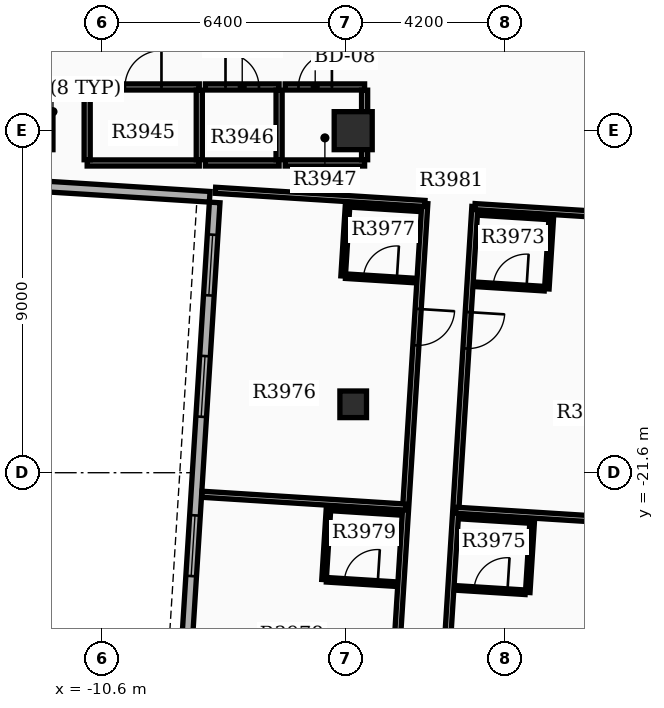
"""IFC4 building model, lengths in metres.
Left out: names, types, materials, properties, quantities, classifications, styles, units other than length and angle.
Written with IfcOpenShell. Run it as: python <this file> out.ifc"""

import sys

from ifc_helpers import new_model, si_unit, direction, frame, frame_2d, origin, origin_2d, place, context, subcontext, project, spatial, rectangle, extrude, element, fill, save


model = new_model("IFC4")
c1 = context("Model", 3, precision=1e-05, world=origin(), true_north=direction((0.0, 1.0)))
c2 = subcontext(c1, "Body", "Model", "MODEL_VIEW")
j1 = project(units=[si_unit("LENGTHUNIT", "METRE"), si_unit("PLANEANGLEUNIT", "RADIAN")], contexts=[c1])
p1 = place(None, origin())
s1 = spatial("IfcSite", under=j1, at=p1, CompositionType="ELEMENT")
p2 = place(p1, origin())
s2 = spatial("IfcBuilding", under=s1, at=p2, CompositionType="ELEMENT")
p3 = place(p2, frame((0.0, 0.0, 249.9)))
s3 = spatial("IfcBuildingStorey", under=s2, at=p3, CompositionType="ELEMENT", Elevation=249.9)
for number, where, z_axis, x_axis in (
    (1, (-12.4, -12.6, 0.0), (0.0, 0.0, 1.0), (1.0, 0.0, 0.0)),
    (2, (-4.0, -12.6, 0.0), (0.0, 0.0, 1.0), (1.0, 0.0, 0.0)),
):
    element("IfcColumn", number, at=place(p3, frame(where, z_axis=z_axis, x_axis=x_axis)), inside=s3, PredefinedType="COLUMN", context=c2, shape_type="SweptSolid", body=[
        extrude(rectangle(XDim=1.0, YDim=1.0, at=origin_2d()), origin(), (0.0, 0.0, 1.0), 3.9),
    ])
p4 = place(p3, frame((-4.0, -19.8, 0.0), z_axis=(0.0, 0.0, 1.0), x_axis=(1.0, 0.0, 0.0)))
e3 = element("IfcColumn", 3, at=p4, inside=s3, PredefinedType="COLUMN", context=c2, shape_type="SweptSolid", body=[
    extrude(rectangle(XDim=0.7, YDim=0.7, at=origin_2d()), origin(), (0.0, 0.0, 1.0), 3.9),
])
p5 = place(p3, frame((-7.645, -14.489, 0.0), z_axis=(0.0, 0.0, 1.0), x_axis=(-0.062794967833, -0.998026448555, 0.0)))
e4 = element("IfcWall", 4, at=p5, inside=s3, PredefinedType="STANDARD", context=c2, shape_type="SweptSolid", body=[
    extrude(rectangle(XDim=14.7, YDim=0.28, at=frame_2d((7.35, 0.0))), origin(), (0.0, 0.0, 1.0), 3.18),
])
p6 = place(p5, frame((0.85, 0.0, 0.8)))
e5 = element("IfcOpeningElement", 5, at=p6, cuts=e4, PredefinedType="OPENING", context=c2, shape_type="SweptSolid", body=[
    extrude(rectangle(XDim=1.6, YDim=1.7, at=frame_2d((0.8, 0.85))), frame((0.0, 0.15, 0.0), z_axis=(0.0, -1.0, 0.0), x_axis=(1.0, 0.0, 0.0)), (0.0, 0.0, 1.0), 0.3),
])
p7 = place(p5, frame((4.05, 0.0, 0.8)))
e6 = element("IfcOpeningElement", 6, at=p7, cuts=e4, PredefinedType="OPENING", context=c2, shape_type="SweptSolid", body=[
    extrude(rectangle(XDim=1.6, YDim=1.7, at=frame_2d((0.8, 0.85))), frame((0.0, 0.15, 0.0), z_axis=(0.0, -1.0, 0.0), x_axis=(1.0, 0.0, 0.0)), (0.0, 0.0, 1.0), 0.3),
])
p8 = place(p5, frame((8.25, 0.0, 0.8)))
e7 = element("IfcOpeningElement", 7, at=p8, cuts=e4, PredefinedType="OPENING", context=c2, shape_type="SweptSolid", body=[
    extrude(rectangle(XDim=1.6, YDim=1.7, at=frame_2d((0.8, 0.85))), frame((0.0, 0.15, 0.0), z_axis=(0.0, -1.0, 0.0), x_axis=(1.0, 0.0, 0.0)), (0.0, 0.0, 1.0), 0.3),
])
p9 = place(p5, frame((11.45, 0.0, 0.8)))
e8 = element("IfcOpeningElement", 8, at=p9, cuts=e4, PredefinedType="OPENING", context=c2, shape_type="SweptSolid", body=[
    extrude(rectangle(XDim=1.6, YDim=1.7, at=frame_2d((0.8, 0.85))), frame((0.0, 0.15, 0.0), z_axis=(0.0, -1.0, 0.0), x_axis=(1.0, 0.0, 0.0)), (0.0, 0.0, 1.0), 0.3),
])
p10 = place(p3, frame((-14.063, -13.945, 0.0), z_axis=(0.0, 0.0, 1.0), x_axis=(0.998027314704, -0.062781200242, 0.0)))
e9 = element("IfcWall", 9, at=p10, inside=s3, PredefinedType="STANDARD", context=c2, shape_type="SweptSolid", body=[
    extrude(rectangle(XDim=6.3, YDim=0.28, at=frame_2d((3.15, 0.0))), origin(), (0.0, 0.0, 1.0), 3.18),
])
p11 = place(p3, frame((-11.0, -13.45, 0.0), z_axis=(0.0, 0.0, 1.0), x_axis=(1.0, 0.0, 0.0)))
e10 = element("IfcWall", 10, at=p11, inside=s3, PredefinedType="PARTITIONING", context=c2, shape_type="SweptSolid", body=[
    extrude(rectangle(XDim=2.95, YDim=0.16, at=frame_2d((1.475, 0.0))), origin(), (0.0, 0.0, 1.0), 3.17),
])
p12 = place(p3, frame((-11.0, -11.45, 0.0), z_axis=(0.0, 0.0, 1.0), x_axis=(1.0, 0.0, 0.0)))
e11 = element("IfcWall", 11, at=p12, inside=s3, PredefinedType="PARTITIONING", context=c2, shape_type="SweptSolid", body=[
    extrude(rectangle(XDim=2.95, YDim=0.16, at=frame_2d((1.475, 0.0))), origin(), (0.0, 0.0, 1.0), 3.17),
])
p13 = place(p12, frame((0.995, 0.0, 0.0)))
e12 = element("IfcOpeningElement", 12, at=p13, cuts=e11, PredefinedType="OPENING", context=c2, shape_type="SweptSolid", body=[
    extrude(rectangle(XDim=0.96, YDim=2.15, at=frame_2d((0.48, 1.075))), frame((0.0, 0.09, 0.0), z_axis=(0.0, -1.0, 0.0), x_axis=(1.0, 0.0, 0.0)), (0.0, 0.0, 1.0), 0.18),
])
for number, where, z_axis, x_axis in (
    (13, (-11.0, -13.365, 0.0), (0.0, 0.0, 1.0), (0.0, 1.0, 0.0)),
    (14, (-8.05, -13.365, 0.0), (0.0, 0.0, 1.0), (0.0, 1.0, 0.0)),
):
    element("IfcWall", number, at=place(p3, frame(where, z_axis=z_axis, x_axis=x_axis)), inside=s3, PredefinedType="PARTITIONING", context=c2, shape_type="SweptSolid", body=[
        extrude(rectangle(XDim=1.83, YDim=0.16, at=frame_2d((0.915, 0.0))), origin(), (0.0, 0.0, 1.0), 3.17),
    ])
p14 = place(p3, frame((-7.89, -13.45, 0.0), z_axis=(0.0, 0.0, 1.0), x_axis=(1.0, 0.0, 0.0)))
e15 = element("IfcWall", 15, at=p14, inside=s3, PredefinedType="PARTITIONING", context=c2, shape_type="SweptSolid", body=[
    extrude(rectangle(XDim=1.94, YDim=0.16, at=frame_2d((0.97, 0.0))), origin(), (0.0, 0.0, 1.0), 3.17),
])
p15 = place(p3, frame((-7.89, -11.45, 0.0), z_axis=(0.0, 0.0, 1.0), x_axis=(1.0, 0.0, 0.0)))
e16 = element("IfcWall", 16, at=p15, inside=s3, PredefinedType="PARTITIONING", context=c2, shape_type="SweptSolid", body=[
    extrude(rectangle(XDim=1.94, YDim=0.16, at=frame_2d((0.97, 0.0))), origin(), (0.0, 0.0, 1.0), 3.17),
])
p16 = place(p15, frame((0.53, 0.0, 0.0)))
e17 = element("IfcOpeningElement", 17, at=p16, cuts=e16, PredefinedType="OPENING", context=c2, shape_type="SweptSolid", body=[
    extrude(rectangle(XDim=0.88, YDim=2.1, at=frame_2d((0.44, 1.05))), frame((0.0, 0.09, 0.0), z_axis=(0.0, -1.0, 0.0), x_axis=(1.0, 0.0, 0.0)), (0.0, 0.0, 1.0), 0.18),
])
p17 = place(p3, frame((-5.95, -13.365, 0.0), z_axis=(0.0, 0.0, 1.0), x_axis=(0.0, 1.0, 0.0)))
e18 = element("IfcWall", 18, at=p17, inside=s3, PredefinedType="PARTITIONING", context=c2, shape_type="SweptSolid", body=[
    extrude(rectangle(XDim=1.83, YDim=0.16, at=frame_2d((0.915, 0.0))), origin(), (0.0, 0.0, 1.0), 3.17),
])
p18 = place(p3, frame((-5.79, -13.45, 0.0), z_axis=(0.0, 0.0, 1.0), x_axis=(1.0, 0.0, 0.0)))
e19 = element("IfcWall", 19, at=p18, inside=s3, PredefinedType="PARTITIONING", context=c2, shape_type="SweptSolid", body=[
    extrude(rectangle(XDim=2.09, YDim=0.16, at=frame_2d((1.045, 0.0))), origin(), (0.0, 0.0, 1.0), 3.17),
])
p19 = place(p3, frame((-5.79, -11.45, 0.0), z_axis=(0.0, 0.0, 1.0), x_axis=(1.0, 0.0, 0.0)))
e20 = element("IfcWall", 20, at=p19, inside=s3, PredefinedType="PARTITIONING", context=c2, shape_type="SweptSolid", body=[
    extrude(rectangle(XDim=2.09, YDim=0.16, at=frame_2d((1.045, 0.0))), origin(), (0.0, 0.0, 1.0), 3.17),
])
p20 = place(p19, frame((0.35, 0.0, 0.0)))
e21 = element("IfcOpeningElement", 21, at=p20, cuts=e20, PredefinedType="OPENING", context=c2, shape_type="SweptSolid", body=[
    extrude(rectangle(XDim=0.88, YDim=2.15, at=frame_2d((0.44, 1.075))), frame((0.0, 0.09, 0.0), z_axis=(0.0, -1.0, 0.0), x_axis=(1.0, 0.0, 0.0)), (0.0, 0.0, 1.0), 0.18),
])
p21 = place(p3, frame((-3.7, -13.365, 0.0), z_axis=(0.0, 0.0, 1.0), x_axis=(0.0, 1.0, 0.0)))
e22 = element("IfcWall", 22, at=p21, inside=s3, PredefinedType="PARTITIONING", context=c2, shape_type="SweptSolid", body=[
    extrude(rectangle(XDim=1.83, YDim=0.16, at=frame_2d((0.915, 0.0))), origin(), (0.0, 0.0, 1.0), 3.17),
])
p22 = place(p3, frame((-0.798, -14.599, 0.0), z_axis=(0.0, 0.0, 1.0), x_axis=(-0.062791373209, -0.998026674719, 0.0)))
e23 = element("IfcWall", 23, at=p22, inside=s3, PredefinedType="PARTITIONING", context=c2, shape_type="SweptSolid", body=[
    extrude(rectangle(XDim=15.012, YDim=0.16, at=frame_2d((7.506, 0.0))), origin(), (0.0, 0.0, 1.0), 3.17),
])
p23 = place(p22, frame((2.78, 0.0, 0.0)))
e24 = element("IfcOpeningElement", 24, at=p23, cuts=e23, PredefinedType="OPENING", context=c2, shape_type="SweptSolid", body=[
    extrude(rectangle(XDim=0.96, YDim=2.15, at=frame_2d((0.48, 1.075))), frame((0.0, 0.09, 0.0), z_axis=(0.0, -1.0, 0.0), x_axis=(1.0, 0.0, 0.0)), (0.0, 0.0, 1.0), 0.18),
])
p24 = place(p22, frame((13.76, 0.0, 0.0)))
e25 = element("IfcOpeningElement", 25, at=p24, cuts=e23, PredefinedType="OPENING", context=c2, shape_type="SweptSolid", body=[
    extrude(rectangle(XDim=0.96, YDim=2.15, at=frame_2d((0.48, 1.075))), frame((0.0, 0.09, 0.0), z_axis=(0.0, -1.0, 0.0), x_axis=(1.0, 0.0, 0.0)), (0.0, 0.0, 1.0), 0.18),
])
p25 = place(p3, frame((-0.798, -14.599, 0.0), z_axis=(0.0, 0.0, 1.0), x_axis=(0.998025424787, -0.06281123689, 0.0)))
e26 = element("IfcWall", 26, at=p25, inside=s3, PredefinedType="PARTITIONING", context=c2, shape_type="SweptSolid", body=[
    extrude(rectangle(XDim=6.6, YDim=0.16, at=frame_2d((3.3, 0.0))), origin(), (0.0, 0.0, 1.0), 3.17),
])
p26 = place(p3, frame((-1.301, -22.587, 0.0), z_axis=(0.0, 0.0, 1.0), x_axis=(0.998027616022, -0.062776410047, 0.0)))
e27 = element("IfcWall", 27, at=p26, inside=s3, PredefinedType="PARTITIONING", context=c2, shape_type="SweptSolid", body=[
    extrude(rectangle(XDim=6.452, YDim=0.16, at=frame_2d((3.226, 0.0))), origin(), (0.0, 0.0, 1.0), 3.17),
])
p27 = place(p3, frame((-0.787, -16.644, 0.0), z_axis=(0.0, 0.0, 1.0), x_axis=(0.998027443946, -0.062779145668, 0.0)))
e28 = element("IfcWall", 28, at=p27, inside=s3, PredefinedType="PARTITIONING", context=c2, shape_type="SweptSolid", body=[
    extrude(rectangle(XDim=1.82, YDim=0.12, at=frame_2d((0.91, 0.0))), origin(), (0.0, 0.0, 1.0), 3.17),
])
p28 = place(p27, frame((0.47, 0.0, 0.0)))
e29 = element("IfcOpeningElement", 29, at=p28, cuts=e28, PredefinedType="OPENING", context=c2, shape_type="SweptSolid", body=[
    extrude(rectangle(XDim=0.88, YDim=2.1, at=frame_2d((0.44, 1.05))), frame((0.0, 0.07, 0.0), z_axis=(0.0, -1.0, 0.0), x_axis=(1.0, 0.0, 0.0)), (0.0, 0.0, 1.0), 0.14),
])
p29 = place(p3, frame((-0.669, -14.767, 0.0), z_axis=(0.0, 0.0, 1.0), x_axis=(0.998027972529, -0.062770741989, 0.0)))
e30 = element("IfcWall", 30, at=p29, inside=s3, PredefinedType="PARTITIONING", context=c2, shape_type="SweptSolid", body=[
    extrude(rectangle(XDim=1.82, YDim=0.12, at=frame_2d((0.91, 0.0))), origin(), (0.0, 0.0, 1.0), 3.17),
])
p30 = place(p3, frame((1.213, -14.885, 0.0), z_axis=(0.0, 0.0, 1.0), x_axis=(-0.062725942896, -0.998030789148, 0.0)))
e31 = element("IfcWall", 31, at=p30, inside=s3, PredefinedType="PARTITIONING", context=c2, shape_type="SweptSolid", body=[
    extrude(rectangle(XDim=1.88, YDim=0.12, at=frame_2d((0.94, 0.0))), origin(), (0.0, 0.0, 1.0), 3.17),
])
p31 = place(p3, frame((-1.289, -24.632, 0.0), z_axis=(0.0, 0.0, 1.0), x_axis=(0.998027443946, -0.062779145668, 0.0)))
e32 = element("IfcWall", 32, at=p31, inside=s3, PredefinedType="PARTITIONING", context=c2, shape_type="SweptSolid", body=[
    extrude(rectangle(XDim=1.82, YDim=0.12, at=frame_2d((0.91, 0.0))), origin(), (0.0, 0.0, 1.0), 3.17),
])
p32 = place(p31, frame((0.47, 0.0, 0.0)))
e33 = element("IfcOpeningElement", 33, at=p32, cuts=e32, PredefinedType="OPENING", context=c2, shape_type="SweptSolid", body=[
    extrude(rectangle(XDim=0.88, YDim=2.1, at=frame_2d((0.44, 1.05))), frame((0.0, 0.07, 0.0), z_axis=(0.0, -1.0, 0.0), x_axis=(1.0, 0.0, 0.0)), (0.0, 0.0, 1.0), 0.14),
])
p33 = place(p3, frame((-1.171, -22.755, 0.0), z_axis=(0.0, 0.0, 1.0), x_axis=(0.998027443946, -0.062779145668, 0.0)))
e34 = element("IfcWall", 34, at=p33, inside=s3, PredefinedType="PARTITIONING", context=c2, shape_type="SweptSolid", body=[
    extrude(rectangle(XDim=1.82, YDim=0.12, at=frame_2d((0.91, 0.0))), origin(), (0.0, 0.0, 1.0), 3.17),
])
p34 = place(p3, frame((0.71, -22.874, 0.0), z_axis=(0.0, 0.0, 1.0), x_axis=(-0.062855297722, -0.998022650819, 0.0)))
e35 = element("IfcWall", 35, at=p34, inside=s3, PredefinedType="PARTITIONING", context=c2, shape_type="SweptSolid", body=[
    extrude(rectangle(XDim=1.88, YDim=0.12, at=frame_2d((0.94, 0.0))), origin(), (0.0, 0.0, 1.0), 3.17),
])
p35 = place(p3, frame((-2.115, -14.516, 0.0), z_axis=(0.0, 0.0, 1.0), x_axis=(-0.062791373209, -0.998026674719, 0.0)))
e36 = element("IfcWall", 36, at=p35, inside=s3, PredefinedType="PARTITIONING", context=c2, shape_type="SweptSolid", body=[
    extrude(rectangle(XDim=15.012, YDim=0.16, at=frame_2d((7.506, 0.0))), origin(), (0.0, 0.0, 1.0), 3.17),
])
p36 = place(p35, frame((2.78, 0.0, 0.0)))
e37 = element("IfcOpeningElement", 37, at=p36, cuts=e36, PredefinedType="OPENING", context=c2, shape_type="SweptSolid", body=[
    extrude(rectangle(XDim=0.96, YDim=2.15, at=frame_2d((0.48, 1.075))), frame((0.0, 0.09, 0.0), z_axis=(0.0, -1.0, 0.0), x_axis=(1.0, 0.0, 0.0)), (0.0, 0.0, 1.0), 0.18),
])
p37 = place(p35, frame((13.76, 0.0, 0.0)))
e38 = element("IfcOpeningElement", 38, at=p37, cuts=e36, PredefinedType="OPENING", context=c2, shape_type="SweptSolid", body=[
    extrude(rectangle(XDim=0.96, YDim=2.15, at=frame_2d((0.48, 1.075))), frame((0.0, 0.09, 0.0), z_axis=(0.0, -1.0, 0.0), x_axis=(1.0, 0.0, 0.0)), (0.0, 0.0, 1.0), 0.18),
])
p38 = place(p3, frame((-2.115, -14.516, 0.0), z_axis=(0.0, 0.0, 1.0), x_axis=(-0.998025986639, 0.062802308829, 0.0)))
e39 = element("IfcWall", 39, at=p38, inside=s3, PredefinedType="PARTITIONING", context=c2, shape_type="SweptSolid", body=[
    extrude(rectangle(XDim=5.52, YDim=0.16, at=frame_2d((2.76, 0.0))), origin(), (0.0, 0.0, 1.0), 3.17),
])
p39 = place(p3, frame((-2.618, -22.504, 0.0), z_axis=(0.0, 0.0, 1.0), x_axis=(-0.998028454231, 0.062763082664, 0.0)))
e40 = element("IfcWall", 40, at=p39, inside=s3, PredefinedType="PARTITIONING", context=c2, shape_type="SweptSolid", body=[
    extrude(rectangle(XDim=5.372, YDim=0.16, at=frame_2d((2.686, 0.0))), origin(), (0.0, 0.0, 1.0), 3.17),
])
p40 = place(p3, frame((-4.2, -16.429, 0.0), z_axis=(0.0, 0.0, 1.0), x_axis=(0.998027972529, -0.062770741989, 0.0)))
e41 = element("IfcWall", 41, at=p40, inside=s3, PredefinedType="PARTITIONING", context=c2, shape_type="SweptSolid", body=[
    extrude(rectangle(XDim=1.82, YDim=0.12, at=frame_2d((0.91, 0.0))), origin(), (0.0, 0.0, 1.0), 3.17),
])
p41 = place(p40, frame((0.47, 0.0, 0.0)))
e42 = element("IfcOpeningElement", 42, at=p41, cuts=e41, PredefinedType="OPENING", context=c2, shape_type="SweptSolid", body=[
    extrude(rectangle(XDim=0.88, YDim=2.1, at=frame_2d((0.44, 1.05))), frame((0.0, 0.07, 0.0), z_axis=(0.0, -1.0, 0.0), x_axis=(1.0, 0.0, 0.0)), (0.0, 0.0, 1.0), 0.14),
])
p42 = place(p3, frame((-4.082, -14.552, 0.0), z_axis=(0.0, 0.0, 1.0), x_axis=(0.998027443946, -0.062779145668, 0.0)))
e43 = element("IfcWall", 43, at=p42, inside=s3, PredefinedType="PARTITIONING", context=c2, shape_type="SweptSolid", body=[
    extrude(rectangle(XDim=1.82, YDim=0.12, at=frame_2d((0.91, 0.0))), origin(), (0.0, 0.0, 1.0), 3.17),
])
p43 = place(p3, frame((-4.147, -14.548, 0.0), z_axis=(0.0, 0.0, 1.0), x_axis=(-0.062725942896, -0.998030789148, 0.0)))
e44 = element("IfcWall", 44, at=p43, inside=s3, PredefinedType="PARTITIONING", context=c2, shape_type="SweptSolid", body=[
    extrude(rectangle(XDim=1.88, YDim=0.12, at=frame_2d((0.94, 0.0))), origin(), (0.0, 0.0, 1.0), 3.17),
])
p44 = place(p3, frame((-4.702, -24.417, 0.0), z_axis=(0.0, 0.0, 1.0), x_axis=(0.998027443946, -0.062779145668, 0.0)))
e45 = element("IfcWall", 45, at=p44, inside=s3, PredefinedType="PARTITIONING", context=c2, shape_type="SweptSolid", body=[
    extrude(rectangle(XDim=1.82, YDim=0.12, at=frame_2d((0.91, 0.0))), origin(), (0.0, 0.0, 1.0), 3.17),
])
p45 = place(p44, frame((0.47, 0.0, 0.0)))
e46 = element("IfcOpeningElement", 46, at=p45, cuts=e45, PredefinedType="OPENING", context=c2, shape_type="SweptSolid", body=[
    extrude(rectangle(XDim=0.88, YDim=2.1, at=frame_2d((0.44, 1.05))), frame((0.0, 0.07, 0.0), z_axis=(0.0, -1.0, 0.0), x_axis=(1.0, 0.0, 0.0)), (0.0, 0.0, 1.0), 0.14),
])
p46 = place(p3, frame((-4.584, -22.541, 0.0), z_axis=(0.0, 0.0, 1.0), x_axis=(0.998027443946, -0.062779145668, 0.0)))
e47 = element("IfcWall", 47, at=p46, inside=s3, PredefinedType="PARTITIONING", context=c2, shape_type="SweptSolid", body=[
    extrude(rectangle(XDim=1.82, YDim=0.12, at=frame_2d((0.91, 0.0))), origin(), (0.0, 0.0, 1.0), 3.17),
])
p47 = place(p3, frame((-4.649, -22.537, 0.0), z_axis=(0.0, 0.0, 1.0), x_axis=(-0.062725942896, -0.998030789148, 0.0)))
e48 = element("IfcWall", 48, at=p47, inside=s3, PredefinedType="PARTITIONING", context=c2, shape_type="SweptSolid", body=[
    extrude(rectangle(XDim=1.88, YDim=0.12, at=frame_2d((0.94, 0.0))), origin(), (0.0, 0.0, 1.0), 3.17),
])
p48 = place(p6, origin())
e49 = element("IfcWindow", 49, at=p48, inside=s3, PartitioningType="SINGLE_PANEL", PredefinedType="WINDOW", context=c2, shape_type="SweptSolid", body=[
    extrude(rectangle(XDim=1.6, YDim=1.7, at=frame_2d((0.8, 0.85))), frame((0.0, 0.03, 0.0), z_axis=(0.0, -1.0, 0.0), x_axis=(1.0, 0.0, 0.0)), (0.0, 0.0, 1.0), 0.06),
])
fill(e5, e49)
p49 = place(p7, origin())
e50 = element("IfcWindow", 50, at=p49, inside=s3, PartitioningType="SINGLE_PANEL", PredefinedType="WINDOW", context=c2, shape_type="SweptSolid", body=[
    extrude(rectangle(XDim=1.6, YDim=1.7, at=frame_2d((0.8, 0.85))), frame((0.0, 0.03, 0.0), z_axis=(0.0, -1.0, 0.0), x_axis=(1.0, 0.0, 0.0)), (0.0, 0.0, 1.0), 0.06),
])
fill(e6, e50)
p50 = place(p8, origin())
e51 = element("IfcWindow", 51, at=p50, inside=s3, PartitioningType="SINGLE_PANEL", PredefinedType="WINDOW", context=c2, shape_type="SweptSolid", body=[
    extrude(rectangle(XDim=1.6, YDim=1.7, at=frame_2d((0.8, 0.85))), frame((0.0, 0.03, 0.0), z_axis=(0.0, -1.0, 0.0), x_axis=(1.0, 0.0, 0.0)), (0.0, 0.0, 1.0), 0.06),
])
fill(e7, e51)
p51 = place(p13, origin())
e52 = element("IfcDoor", 52, at=p51, inside=s3, OperationType="SINGLE_SWING_RIGHT", PredefinedType="DOOR", context=c2, shape_type="SweptSolid", body=[
    extrude(rectangle(XDim=0.96, YDim=2.15, at=frame_2d((0.48, 1.075))), frame((0.0, 0.025, 0.0), z_axis=(0.0, -1.0, 0.0), x_axis=(1.0, 0.0, 0.0)), (0.0, 0.0, 1.0), 0.05),
])
fill(e12, e52)
p52 = place(p16, origin())
e53 = element("IfcDoor", 53, at=p52, inside=s3, OperationType="SINGLE_SWING_LEFT", PredefinedType="DOOR", context=c2, shape_type="SweptSolid", body=[
    extrude(rectangle(XDim=0.88, YDim=2.1, at=frame_2d((0.44, 1.05))), frame((0.0, 0.025, 0.0), z_axis=(0.0, -1.0, 0.0), x_axis=(1.0, 0.0, 0.0)), (0.0, 0.0, 1.0), 0.05),
])
fill(e17, e53)
p53 = place(p20, origin())
e54 = element("IfcDoor", 54, at=p53, inside=s3, OperationType="SINGLE_SWING_RIGHT", PredefinedType="DOOR", context=c2, shape_type="SweptSolid", body=[
    extrude(rectangle(XDim=0.88, YDim=2.15, at=frame_2d((0.44, 1.075))), frame((0.0, 0.025, 0.0), z_axis=(0.0, -1.0, 0.0), x_axis=(1.0, 0.0, 0.0)), (0.0, 0.0, 1.0), 0.05),
])
fill(e21, e54)
p54 = place(p23, origin())
e55 = element("IfcDoor", 55, at=p54, inside=s3, OperationType="SINGLE_SWING_LEFT", PredefinedType="DOOR", context=c2, shape_type="SweptSolid", body=[
    extrude(rectangle(XDim=0.96, YDim=2.15, at=frame_2d((0.48, 1.075))), frame((0.0, 0.025, 0.0), z_axis=(0.0, -1.0, 0.0), x_axis=(1.0, 0.0, 0.0)), (0.0, 0.0, 1.0), 0.05),
])
fill(e24, e55)
p55 = place(p28, origin())
e56 = element("IfcDoor", 56, at=p55, inside=s3, OperationType="SINGLE_SWING_RIGHT", PredefinedType="DOOR", context=c2, shape_type="SweptSolid", body=[
    extrude(rectangle(XDim=0.88, YDim=2.1, at=frame_2d((0.44, 1.05))), frame((0.0, 0.025, 0.0), z_axis=(0.0, -1.0, 0.0), x_axis=(1.0, 0.0, 0.0)), (0.0, 0.0, 1.0), 0.05),
])
fill(e29, e56)
p56 = place(p32, origin())
e57 = element("IfcDoor", 57, at=p56, inside=s3, OperationType="SINGLE_SWING_RIGHT", PredefinedType="DOOR", context=c2, shape_type="SweptSolid", body=[
    extrude(rectangle(XDim=0.88, YDim=2.1, at=frame_2d((0.44, 1.05))), frame((0.0, 0.025, 0.0), z_axis=(0.0, -1.0, 0.0), x_axis=(1.0, 0.0, 0.0)), (0.0, 0.0, 1.0), 0.05),
])
fill(e33, e57)
p57 = place(p36, origin())
e58 = element("IfcDoor", 58, at=p57, inside=s3, OperationType="SINGLE_SWING_LEFT", PredefinedType="DOOR", context=c2, shape_type="SweptSolid", body=[
    extrude(rectangle(XDim=0.96, YDim=2.15, at=frame_2d((0.48, 1.075))), frame((0.0, 0.025, 0.0), z_axis=(0.0, -1.0, 0.0), x_axis=(1.0, 0.0, 0.0)), (0.0, 0.0, 1.0), 0.05),
])
fill(e37, e58)
p58 = place(p41, origin())
e59 = element("IfcDoor", 59, at=p58, inside=s3, OperationType="SINGLE_SWING_RIGHT", PredefinedType="DOOR", context=c2, shape_type="SweptSolid", body=[
    extrude(rectangle(XDim=0.88, YDim=2.1, at=frame_2d((0.44, 1.05))), frame((0.0, 0.025, 0.0), z_axis=(0.0, -1.0, 0.0), x_axis=(1.0, 0.0, 0.0)), (0.0, 0.0, 1.0), 0.05),
])
fill(e42, e59)
p59 = place(p45, origin())
e60 = element("IfcDoor", 60, at=p59, inside=s3, OperationType="SINGLE_SWING_RIGHT", PredefinedType="DOOR", context=c2, shape_type="SweptSolid", body=[
    extrude(rectangle(XDim=0.88, YDim=2.1, at=frame_2d((0.44, 1.05))), frame((0.0, 0.025, 0.0), z_axis=(0.0, -1.0, 0.0), x_axis=(1.0, 0.0, 0.0)), (0.0, 0.0, 1.0), 0.05),
])
fill(e46, e60)
save(model, sys.argv[1])
